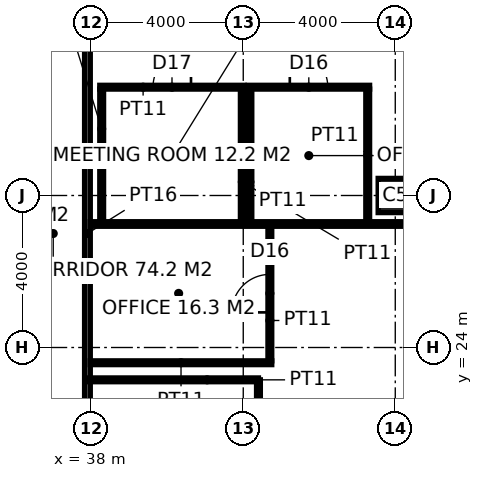
"""IFC4 building model, lengths in metres.
Left out: names, types, materials, properties, quantities, classifications, styles, units other than length and angle.
Written with IfcOpenShell. Run it as: python <this file> out.ifc"""

import sys

from ifc_helpers import new_model, si_unit, direction, frame, frame_2d, origin, origin_2d, place, context, subcontext, project, spatial, rectangle, hollow_rectangle, extrude, element, fill, save


model = new_model("IFC4")
c1 = context("Model", 3, precision=1e-05, world=origin(), true_north=direction((0.0, 1.0)))
c2 = subcontext(c1, "Body", "Model", "MODEL_VIEW")
j1 = project(units=[si_unit("LENGTHUNIT", "METRE"), si_unit("PLANEANGLEUNIT", "RADIAN")], contexts=[c1])
p1 = place(None, origin())
s1 = spatial("IfcSite", under=j1, at=p1, CompositionType="ELEMENT")
p2 = place(p1, origin())
s2 = spatial("IfcBuilding", under=s1, at=p2, CompositionType="ELEMENT")
p3 = place(p2, frame((0.0, 0.0, 93.4)))
s3 = spatial("IfcBuildingStorey", under=s2, at=p3, CompositionType="ELEMENT", Elevation=93.4)
p4 = place(p3, frame((46.0, 28.0, 0.0), z_axis=(0.0, 0.0, 1.0), x_axis=(1.0, 0.0, 0.0)))
e1 = element("IfcColumn", 1, at=p4, inside=s3, PredefinedType="COLUMN", context=c2, shape_type="SweptSolid", body=[
    extrude(hollow_rectangle(XDim=0.9, YDim=0.9, WallThickness=0.1, at=origin_2d()), origin(), (0.0, 0.0, 1.0), 4.0),
])
p5 = place(p3, frame((37.9, 15.625, 0.0), z_axis=(0.0, 0.0, 1.0), x_axis=(0.0, 1.0, 0.0)))
e2 = element("IfcWall", 2, at=p5, inside=s3, PredefinedType="PARTITIONING", context=c2, shape_type="SweptSolid", body=[
    extrude(rectangle(XDim=22.75, YDim=0.15, at=frame_2d((11.375, 0.0))), origin(), (0.0, 0.0, 1.0), 2.95),
])
p6 = place(p5, frame((4.974, 0.0, 0.0)))
e3 = element("IfcOpeningElement", 3, at=p6, cuts=e2, PredefinedType="OPENING", context=c2, shape_type="SweptSolid", body=[
    extrude(rectangle(XDim=1.8, YDim=2.4, at=frame_2d((0.9, 1.2))), frame((0.0, 0.085, 0.0), z_axis=(0.0, -1.0, 0.0), x_axis=(1.0, 0.0, 0.0)), (0.0, 0.0, 1.0), 0.17),
])
p7 = place(p5, frame((16.226, 0.0, 0.0)))
e4 = element("IfcOpeningElement", 4, at=p7, cuts=e2, PredefinedType="OPENING", context=c2, shape_type="SweptSolid", body=[
    extrude(rectangle(XDim=1.8, YDim=2.4, at=frame_2d((0.9, 1.2))), frame((0.0, 0.085, 0.0), z_axis=(0.0, -1.0, 0.0), x_axis=(1.0, 0.0, 0.0)), (0.0, 0.0, 1.0), 0.17),
])
p8 = place(p3, frame((37.975, 27.25, 0.0), z_axis=(0.0, 0.0, 1.0), x_axis=(1.0, 0.0, 0.0)))
e5 = element("IfcWall", 5, at=p8, inside=s3, PredefinedType="PARTITIONING", context=c2, shape_type="SweptSolid", body=[
    extrude(rectangle(XDim=19.725, YDim=0.12, at=frame_2d((9.862, 0.0))), origin(), (0.0, 0.0, 1.0), 3.85),
])
p9 = place(p3, frame((37.975, 23.599, 0.0), z_axis=(0.0, 0.0, 1.0), x_axis=(1.0, 0.0, 0.0)))
e6 = element("IfcWall", 6, at=p9, inside=s3, PredefinedType="PARTITIONING", context=c2, shape_type="SweptSolid", body=[
    extrude(rectangle(XDim=4.775, YDim=0.1, at=frame_2d((2.387, 0.0))), origin(), (0.0, 0.0, 1.0), 2.95),
])
p10 = place(p3, frame((38.225, 30.85, 0.0), z_axis=(0.0, 0.0, 1.0), x_axis=(1.0, 0.0, 0.0)))
e7 = element("IfcWall", 7, at=p10, inside=s3, PredefinedType="PARTITIONING", context=c2, shape_type="SweptSolid", body=[
    extrude(rectangle(XDim=3.8, YDim=0.1, at=frame_2d((1.9, 0.0))), origin(), (0.0, 0.0, 1.0), 3.85),
])
p11 = place(p10, frame((1.4, 0.0, 0.0)))
e8 = element("IfcOpeningElement", 8, at=p11, cuts=e7, PredefinedType="OPENING", context=c2, shape_type="SweptSolid", body=[
    extrude(rectangle(XDim=1.0, YDim=2.2, at=frame_2d((0.5, 1.1))), frame((0.0, 0.06, 0.0), z_axis=(0.0, -1.0, 0.0), x_axis=(1.0, 0.0, 0.0)), (0.0, 0.0, 1.0), 0.12),
])
p12 = place(p3, frame((42.125, 30.85, 0.0), z_axis=(0.0, 0.0, 1.0), x_axis=(1.0, 0.0, 0.0)))
e9 = element("IfcWall", 9, at=p12, inside=s3, PredefinedType="PARTITIONING", context=c2, shape_type="SweptSolid", body=[
    extrude(rectangle(XDim=3.2, YDim=0.1, at=frame_2d((1.6, 0.0))), origin(), (0.0, 0.0, 1.0), 3.85),
])
p13 = place(p12, frame((1.1, 0.0, 0.0)))
e10 = element("IfcOpeningElement", 10, at=p13, cuts=e9, PredefinedType="OPENING", context=c2, shape_type="SweptSolid", body=[
    extrude(rectangle(XDim=1.0, YDim=2.2, at=frame_2d((0.5, 1.1))), frame((0.0, 0.06, 0.0), z_axis=(0.0, -1.0, 0.0), x_axis=(1.0, 0.0, 0.0)), (0.0, 0.0, 1.0), 0.12),
])
for number, where, z_axis, x_axis in (
    (11, (38.275, 27.31, 0.0), (0.0, 0.0, 1.0), (0.0, 1.0, 0.0)),
    (12, (41.975, 27.31, 0.0), (0.0, 0.0, 1.0), (0.0, 1.0, 0.0)),
    (13, (42.175, 27.31, 0.0), (0.0, 0.0, 1.0), (0.0, 1.0, 0.0)),
):
    element("IfcWall", number, at=place(p3, frame(where, z_axis=z_axis, x_axis=x_axis)), inside=s3, PredefinedType="PARTITIONING", context=c2, shape_type="SweptSolid", body=[
        extrude(rectangle(XDim=3.49, YDim=0.1, at=frame_2d((1.745, 0.0))), origin(), (0.0, 0.0, 1.0), 3.85),
    ])
p14 = place(p3, frame((42.7, 23.649, 0.0), z_axis=(0.0, 0.0, 1.0), x_axis=(0.0, 1.0, 0.0)))
e14 = element("IfcWall", 14, at=p14, inside=s3, PredefinedType="PARTITIONING", context=c2, shape_type="SweptSolid", body=[
    extrude(rectangle(XDim=3.54, YDim=0.1, at=frame_2d((1.77, 0.0))), origin(), (0.0, 0.0, 1.0), 3.85),
])
p15 = place(p14, frame((1.275, 0.0, 0.0)))
e15 = element("IfcOpeningElement", 15, at=p15, cuts=e14, PredefinedType="OPENING", context=c2, shape_type="SweptSolid", body=[
    extrude(rectangle(XDim=1.0, YDim=2.2, at=frame_2d((0.5, 1.1))), frame((0.0, 0.06, 0.0), z_axis=(0.0, -1.0, 0.0), x_axis=(1.0, 0.0, 0.0)), (0.0, 0.0, 1.0), 0.12),
])
p16 = place(p3, frame((45.275, 27.31, 0.0), z_axis=(0.0, 0.0, 1.0), x_axis=(0.0, 1.0, 0.0)))
e16 = element("IfcWall", 16, at=p16, inside=s3, PredefinedType="PARTITIONING", context=c2, shape_type="SweptSolid", body=[
    extrude(rectangle(XDim=3.49, YDim=0.1, at=frame_2d((1.745, 0.0))), origin(), (0.0, 0.0, 1.0), 3.85),
])
p17 = place(p3, frame((42.4, 18.049, 0.0), z_axis=(0.0, 0.0, 1.0), x_axis=(0.0, 1.0, 0.0)))
e17 = element("IfcWall", 17, at=p17, inside=s3, PredefinedType="PARTITIONING", context=c2, shape_type="SweptSolid", body=[
    extrude(rectangle(XDim=5.1, YDim=0.1, at=frame_2d((2.55, 0.0))), origin(), (0.0, 0.0, 1.0), 3.85),
])
p18 = place(p17, frame((2.05, 0.0, 0.0)))
e18 = element("IfcOpeningElement", 18, at=p18, cuts=e17, PredefinedType="OPENING", context=c2, shape_type="SweptSolid", body=[
    extrude(rectangle(XDim=1.0, YDim=2.2, at=frame_2d((0.5, 1.1))), frame((0.0, 0.06, 0.0), z_axis=(0.0, -1.0, 0.0), x_axis=(1.0, 0.0, 0.0)), (0.0, 0.0, 1.0), 0.12),
])
p19 = place(p3, frame((42.4, 23.149, 0.0), z_axis=(0.0, 0.0, 1.0), x_axis=(-1.0, 0.0, 0.0)))
e19 = element("IfcWall", 19, at=p19, inside=s3, PredefinedType="PARTITIONING", context=c2, shape_type="SweptSolid", body=[
    extrude(rectangle(XDim=4.5, YDim=0.1, at=frame_2d((2.25, 0.0))), origin(), (0.0, 0.0, 1.0), 3.85),
])
p20 = place(p15, origin())
e20 = element("IfcDoor", 20, at=p20, inside=s3, OperationType="SINGLE_SWING_LEFT", PredefinedType="DOOR", context=c2, shape_type="SweptSolid", body=[
    extrude(rectangle(XDim=1.0, YDim=2.2, at=frame_2d((0.5, 1.1))), frame((0.0, 0.025, 0.0), z_axis=(0.0, -1.0, 0.0), x_axis=(1.0, 0.0, 0.0)), (0.0, 0.0, 1.0), 0.05),
])
fill(e15, e20)
p21 = place(p11, origin())
e21 = element("IfcDoor", 21, at=p21, inside=s3, OperationType="SINGLE_SWING_RIGHT", PredefinedType="DOOR", context=c2, shape_type="SweptSolid", body=[
    extrude(rectangle(XDim=1.0, YDim=2.2, at=frame_2d((0.5, 1.1))), frame((0.0, 0.025, 0.0), z_axis=(0.0, -1.0, 0.0), x_axis=(1.0, 0.0, 0.0)), (0.0, 0.0, 1.0), 0.05),
])
fill(e8, e21)
p22 = place(p13, origin())
e22 = element("IfcDoor", 22, at=p22, inside=s3, OperationType="SINGLE_SWING_LEFT", PredefinedType="DOOR", context=c2, shape_type="SweptSolid", body=[
    extrude(rectangle(XDim=1.0, YDim=2.2, at=frame_2d((0.5, 1.1))), frame((0.0, 0.025, 0.0), z_axis=(0.0, -1.0, 0.0), x_axis=(1.0, 0.0, 0.0)), (0.0, 0.0, 1.0), 0.05),
])
fill(e10, e22)
save(model, sys.argv[1])
